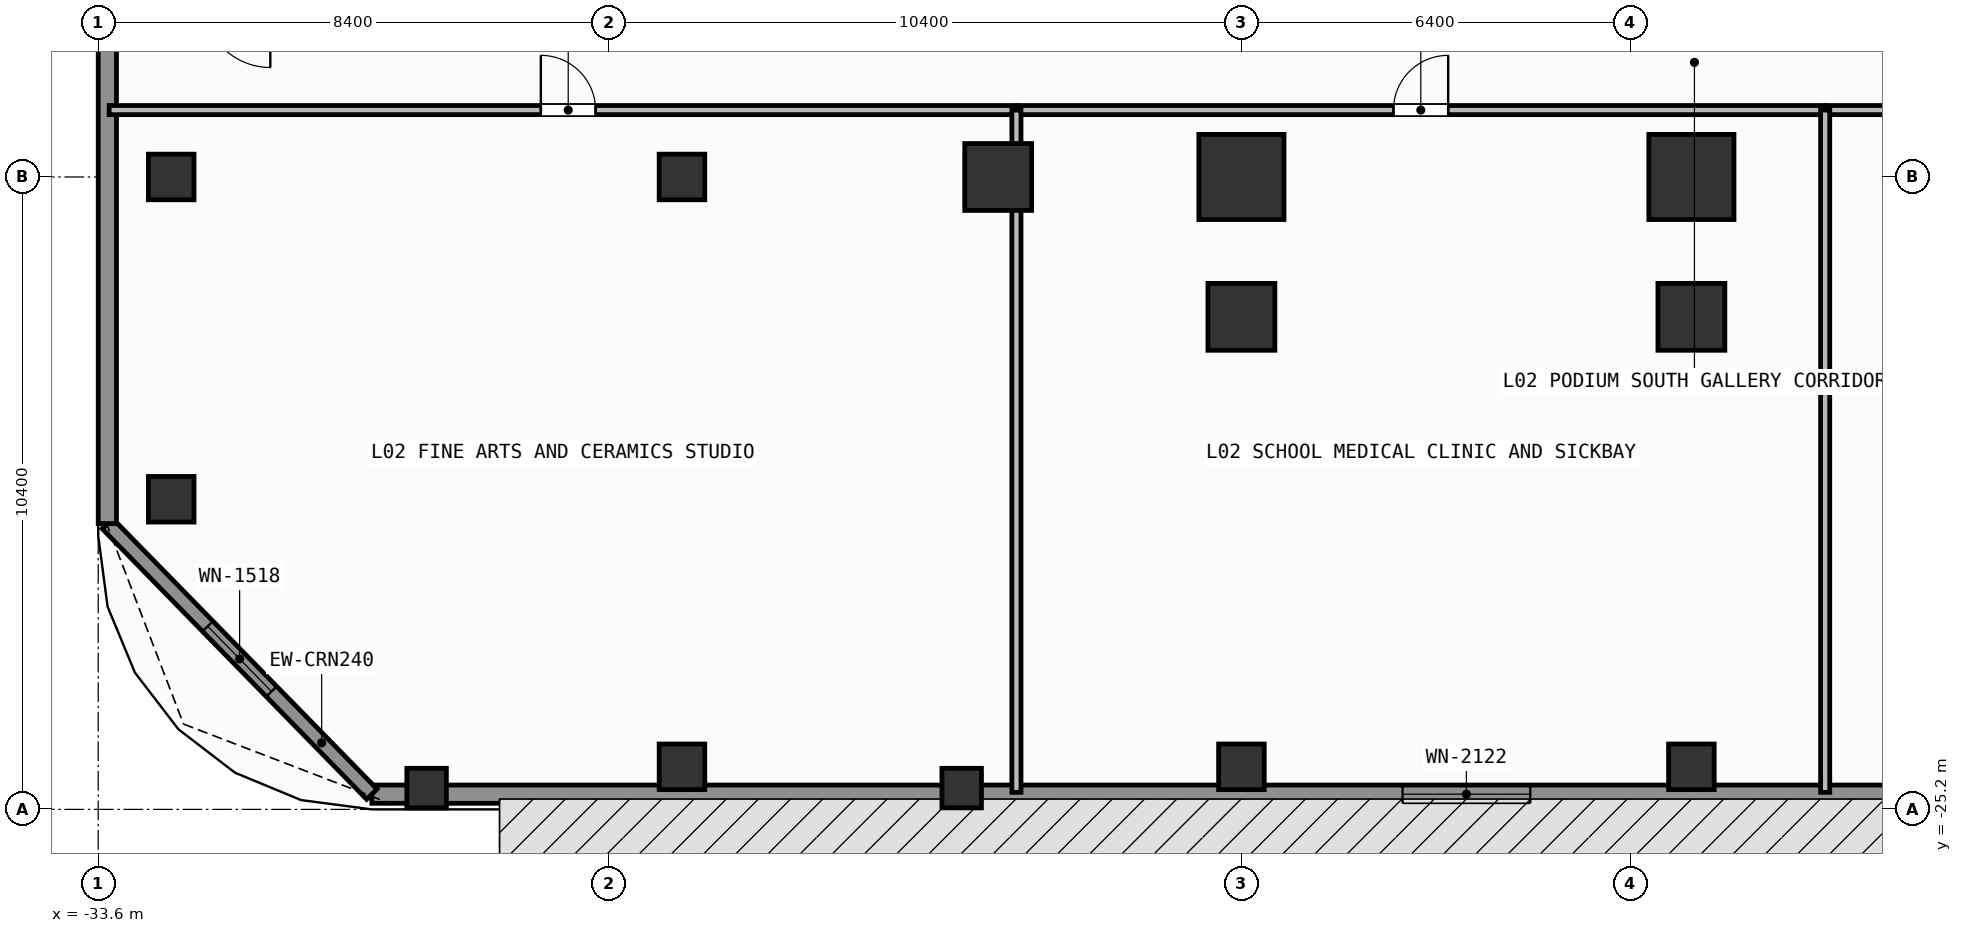
"""IFC4 building model, lengths in metres.
Left out: names, types, materials, properties, quantities, classifications, styles, units other than length and angle.
Written with IfcOpenShell. Run it as: python <this file> out.ifc"""

import sys

from ifc_helpers import new_model, si_unit, direction, frame, frame_2d, origin, origin_2d, place, context, subcontext, project, spatial, rectangle, extrude, element, fill, save


model = new_model("IFC4")
c1 = context("Model", 3, precision=1e-05, world=origin(), true_north=direction((0.0, 1.0)))
c2 = subcontext(c1, "Body", "Model", "MODEL_VIEW")
j1 = project(units=[si_unit("LENGTHUNIT", "METRE"), si_unit("PLANEANGLEUNIT", "RADIAN")], contexts=[c1])
p1 = place(None, origin())
s1 = spatial("IfcSite", under=j1, at=p1, CompositionType="ELEMENT")
p2 = place(p1, origin())
s2 = spatial("IfcBuilding", under=s1, at=p2, CompositionType="ELEMENT")
p3 = place(p2, frame((0.0, 0.0, 4.8)))
s3 = spatial("IfcBuildingStorey", under=s2, at=p3, CompositionType="ELEMENT", Elevation=4.8)
for number, where, z_axis, x_axis in (
    (1, (-14.8, -14.8, 0.0), (0.0, 0.0, 1.0), (1.0, 0.0, 0.0)),
    (2, (-7.4, -14.8, 0.0), (0.0, 0.0, 1.0), (1.0, 0.0, 0.0)),
):
    element("IfcColumn", number, at=place(p3, frame(where, z_axis=z_axis, x_axis=x_axis)), inside=s3, PredefinedType="COLUMN", context=c2, shape_type="SweptSolid", body=[
        extrude(rectangle(XDim=1.4, YDim=1.4, at=origin_2d()), origin(), (0.0, 0.0, 1.0), 4.2),
    ])
for number, where, z_axis, x_axis in (
    (3, (-18.8, -14.8, 0.0), (0.0, 0.0, 1.0), (1.0, 0.0, 0.0)),
    (4, (-14.8, -17.1, 0.0), (0.0, 0.0, 1.0), (1.0, 0.0, 0.0)),
    (5, (-7.4, -17.1, 0.0), (0.0, 0.0, 1.0), (1.0, 0.0, 0.0)),
):
    element("IfcColumn", number, at=place(p3, frame(where, z_axis=z_axis, x_axis=x_axis)), inside=s3, PredefinedType="COLUMN", context=c2, shape_type="SweptSolid", body=[
        extrude(rectangle(XDim=1.1, YDim=1.1, at=origin_2d()), origin(), (0.0, 0.0, 1.0), 4.2),
    ])
for number, where, z_axis, x_axis in (
    (6, (-32.4, -14.8, 0.0), (0.0, 0.0, 1.0), (1.0, 0.0, 0.0)),
    (7, (-24.0, -24.5, 0.0), (0.0, 0.0, 1.0), (1.0, 0.0, 0.0)),
    (8, (-24.0, -14.8, 0.0), (0.0, 0.0, 1.0), (1.0, 0.0, 0.0)),
    (9, (-14.8, -24.5, 0.0), (0.0, 0.0, 1.0), (1.0, 0.0, 0.0)),
    (10, (-7.4, -24.5, 0.0), (0.0, 0.0, 1.0), (1.0, 0.0, 0.0)),
    (11, (-32.4, -20.1, 0.0), (0.0, 0.0, 1.0), (1.0, 0.0, 0.0)),
):
    element("IfcColumn", number, at=place(p3, frame(where, z_axis=z_axis, x_axis=x_axis)), inside=s3, PredefinedType="COLUMN", context=c2, shape_type="SweptSolid", body=[
        extrude(rectangle(XDim=0.75, YDim=0.75, at=origin_2d()), origin(), (0.0, 0.0, 1.0), 4.2),
    ])
for number, where, z_axis, x_axis in (
    (12, (-28.2, -24.85, 0.0), (0.0, 0.0, 1.0), (1.0, 0.0, 0.0)),
    (13, (-19.4, -24.85, 0.0), (0.0, 0.0, 1.0), (1.0, 0.0, 0.0)),
):
    element("IfcColumn", number, at=place(p3, frame(where, z_axis=z_axis, x_axis=x_axis)), inside=s3, PredefinedType="PILASTER", context=c2, shape_type="SweptSolid", body=[
        extrude(rectangle(XDim=0.65, YDim=0.65, at=origin_2d()), origin(), (0.0, 0.0, 1.0), 4.2),
    ])
p4 = place(p3, frame((29.1, -24.95, 0.0), z_axis=(0.0, 0.0, 1.0), x_axis=(-1.0, 0.0, 0.0)))
e14 = element("IfcWall", 14, at=p4, inside=s3, PredefinedType="SOLIDWALL", context=c2, shape_type="SweptSolid", body=[
    extrude(rectangle(XDim=58.2, YDim=0.3, at=frame_2d((29.1, 0.0))), origin(), (0.0, 0.0, 1.0), 3.96),
])
p5 = place(p4, frame((39.15, 0.0, 0.85)))
e15 = element("IfcOpeningElement", 15, at=p5, cuts=e14, PredefinedType="OPENING", context=c2, shape_type="SweptSolid", body=[
    extrude(rectangle(XDim=2.1, YDim=2.2, at=frame_2d((1.05, 1.1))), frame((0.0, 0.16, 0.0), z_axis=(0.0, -1.0, 0.0), x_axis=(1.0, 0.0, 0.0)), (0.0, 0.0, 1.0), 0.32),
])
p6 = place(p4, frame((30.875, 0.0, 0.85)))
e16 = element("IfcOpeningElement", 16, at=p6, cuts=e14, PredefinedType="OPENING", context=c2, shape_type="SweptSolid", body=[
    extrude(rectangle(XDim=2.1, YDim=2.2, at=frame_2d((1.05, 1.1))), frame((0.0, 0.16, 0.0), z_axis=(0.0, -1.0, 0.0), x_axis=(1.0, 0.0, 0.0)), (0.0, 0.0, 1.0), 0.32),
])
p7 = place(p4, frame((24.35, 0.0, 0.85)))
e17 = element("IfcOpeningElement", 17, at=p7, cuts=e14, PredefinedType="OPENING", context=c2, shape_type="SweptSolid", body=[
    extrude(rectangle(XDim=2.1, YDim=2.2, at=frame_2d((1.05, 1.1))), frame((0.0, 0.16, 0.0), z_axis=(0.0, -1.0, 0.0), x_axis=(1.0, 0.0, 0.0)), (0.0, 0.0, 1.0), 0.32),
])
p8 = place(p4, frame((18.325, 0.0, 0.85)))
e18 = element("IfcOpeningElement", 18, at=p8, cuts=e14, PredefinedType="OPENING", context=c2, shape_type="SweptSolid", body=[
    extrude(rectangle(XDim=2.1, YDim=2.2, at=frame_2d((1.05, 1.1))), frame((0.0, 0.16, 0.0), z_axis=(0.0, -1.0, 0.0), x_axis=(1.0, 0.0, 0.0)), (0.0, 0.0, 1.0), 0.32),
])
p9 = place(p4, frame((6.483, 0.0, 0.85)))
e19 = element("IfcOpeningElement", 19, at=p9, cuts=e14, PredefinedType="OPENING", context=c2, shape_type="SweptSolid", body=[
    extrude(rectangle(XDim=2.1, YDim=2.2, at=frame_2d((1.05, 1.1))), frame((0.0, 0.16, 0.0), z_axis=(0.0, -1.0, 0.0), x_axis=(1.0, 0.0, 0.0)), (0.0, 0.0, 1.0), 0.32),
])
p10 = place(p3, frame((-29.1, -24.95, 0.0), z_axis=(0.0, 0.0, 1.0), x_axis=(-0.69901822973, 0.715103848756, 0.0)))
e20 = element("IfcWall", 20, at=p10, inside=s3, PredefinedType="SOLIDWALL", context=c2, shape_type="SweptSolid", body=[
    extrude(rectangle(XDim=6.223, YDim=0.24, at=frame_2d((3.111, 0.0))), origin(), (0.0, 0.0, 1.0), 3.96),
])
p11 = place(p10, frame((2.362, 0.0, 0.85)))
e21 = element("IfcOpeningElement", 21, at=p11, cuts=e20, PredefinedType="OPENING", context=c2, shape_type="SweptSolid", body=[
    extrude(rectangle(XDim=1.5, YDim=1.85, at=frame_2d((0.75, 0.925))), frame((0.0, 0.13, 0.0), z_axis=(0.0, -1.0, 0.0), x_axis=(1.0, 0.0, 0.0)), (0.0, 0.0, 1.0), 0.26),
])
p12 = place(p3, frame((-33.45, -20.5, 0.0), z_axis=(0.0, 0.0, 1.0), x_axis=(0.0, 1.0, 0.0)))
e22 = element("IfcWall", 22, at=p12, inside=s3, PredefinedType="SOLIDWALL", context=c2, shape_type="SweptSolid", body=[
    extrude(rectangle(XDim=14.09, YDim=0.3, at=frame_2d((7.045, 0.0))), origin(), (0.0, 0.0, 1.0), 3.96),
])
p13 = place(p3, frame((-33.42, -13.7, 0.0), z_axis=(0.0, 0.0, 1.0), x_axis=(1.0, 0.0, 0.0)))
e23 = element("IfcWall", 23, at=p13, inside=s3, PredefinedType="PARTITIONING", context=c2, shape_type="SweptSolid", body=[
    extrude(rectangle(XDim=14.92, YDim=0.15, at=frame_2d((7.46, 0.0))), origin(), (0.0, 0.0, 1.0), 3.96),
])
p14 = place(p13, frame((7.099, 0.0, 0.0)))
e24 = element("IfcOpeningElement", 24, at=p14, cuts=e23, PredefinedType="OPENING", context=c2, shape_type="SweptSolid", body=[
    extrude(rectangle(XDim=0.9, YDim=2.1, at=frame_2d((0.45, 1.05))), frame((0.0, 0.085, 0.0), z_axis=(0.0, -1.0, 0.0), x_axis=(1.0, 0.0, 0.0)), (0.0, 0.0, 1.0), 0.17),
])
p15 = place(p3, frame((-18.5, -13.7, 0.0), z_axis=(0.0, 0.0, 1.0), x_axis=(1.0, 0.0, 0.0)))
e25 = element("IfcWall", 25, at=p15, inside=s3, PredefinedType="PARTITIONING", context=c2, shape_type="SweptSolid", body=[
    extrude(rectangle(XDim=13.3, YDim=0.15, at=frame_2d((6.65, 0.0))), origin(), (0.0, 0.0, 1.0), 3.96),
])
p16 = place(p15, frame((6.2, 0.0, 0.0)))
e26 = element("IfcOpeningElement", 26, at=p16, cuts=e25, PredefinedType="OPENING", context=c2, shape_type="SweptSolid", body=[
    extrude(rectangle(XDim=0.9, YDim=2.1, at=frame_2d((0.45, 1.05))), frame((0.0, 0.085, 0.0), z_axis=(0.0, -1.0, 0.0), x_axis=(1.0, 0.0, 0.0)), (0.0, 0.0, 1.0), 0.17),
])
p17 = place(p3, frame((-5.2, -13.7, 0.0), z_axis=(0.0, 0.0, 1.0), x_axis=(1.0, 0.0, 0.0)))
e27 = element("IfcWall", 27, at=p17, inside=s3, PredefinedType="PARTITIONING", context=c2, shape_type="SweptSolid", body=[
    extrude(rectangle(XDim=16.8, YDim=0.15, at=frame_2d((8.4, 0.0))), origin(), (0.0, 0.0, 1.0), 3.96),
])
p18 = place(p17, frame((7.861, 0.0, 0.0)))
e28 = element("IfcOpeningElement", 28, at=p18, cuts=e27, PredefinedType="OPENING", context=c2, shape_type="SweptSolid", body=[
    extrude(rectangle(XDim=0.9, YDim=2.1, at=frame_2d((0.45, 1.05))), frame((0.0, 0.085, 0.0), z_axis=(0.0, -1.0, 0.0), x_axis=(1.0, 0.0, 0.0)), (0.0, 0.0, 1.0), 0.17),
])
p19 = place(p3, frame((-18.5, -24.92, 0.0), z_axis=(0.0, 0.0, 1.0), x_axis=(0.0, 1.0, 0.0)))
e29 = element("IfcWall", 29, at=p19, inside=s3, PredefinedType="PARTITIONING", context=c2, shape_type="SweptSolid", body=[
    extrude(rectangle(XDim=11.22, YDim=0.15, at=frame_2d((5.61, 0.0))), origin(), (0.0, 0.0, 1.0), 3.25),
])
p20 = place(p3, frame((-5.2, -24.92, 0.0), z_axis=(0.0, 0.0, 1.0), x_axis=(0.0, 1.0, 0.0)))
e30 = element("IfcWall", 30, at=p20, inside=s3, PredefinedType="PARTITIONING", context=c2, shape_type="SweptSolid", body=[
    extrude(rectangle(XDim=11.22, YDim=0.15, at=frame_2d((5.61, 0.0))), origin(), (0.0, 0.0, 1.0), 3.96),
])
p21 = place(p11, origin())
e31 = element("IfcWindow", 31, at=p21, inside=s3, PartitioningType="SINGLE_PANEL", PredefinedType="WINDOW", context=c2, shape_type="SweptSolid", body=[
    extrude(rectangle(XDim=1.5, YDim=1.85, at=frame_2d((0.75, 0.925))), frame((0.0, 0.03, 0.0), z_axis=(0.0, -1.0, 0.0), x_axis=(1.0, 0.0, 0.0)), (0.0, 0.0, 1.0), 0.06),
])
fill(e21, e31)
p22 = place(p5, origin())
e32 = element("IfcWindow", 32, at=p22, inside=s3, PartitioningType="SINGLE_PANEL", PredefinedType="WINDOW", context=c2, shape_type="SweptSolid", body=[
    extrude(rectangle(XDim=2.1, YDim=2.2, at=frame_2d((1.05, 1.1))), frame((0.0, 0.03, 0.0), z_axis=(0.0, -1.0, 0.0), x_axis=(1.0, 0.0, 0.0)), (0.0, 0.0, 1.0), 0.06),
])
fill(e15, e32)
p23 = place(p14, origin())
e33 = element("IfcDoor", 33, at=p23, inside=s3, OperationType="SINGLE_SWING_LEFT", PredefinedType="DOOR", context=c2, shape_type="SweptSolid", body=[
    extrude(rectangle(XDim=0.9, YDim=2.1, at=frame_2d((0.45, 1.05))), frame((0.0, 0.025, 0.0), z_axis=(0.0, -1.0, 0.0), x_axis=(1.0, 0.0, 0.0)), (0.0, 0.0, 1.0), 0.05),
])
fill(e24, e33)
p24 = place(p16, origin())
e34 = element("IfcDoor", 34, at=p24, inside=s3, OperationType="SINGLE_SWING_RIGHT", PredefinedType="DOOR", context=c2, shape_type="SweptSolid", body=[
    extrude(rectangle(XDim=0.9, YDim=2.1, at=frame_2d((0.45, 1.05))), frame((0.0, 0.025, 0.0), z_axis=(0.0, -1.0, 0.0), x_axis=(1.0, 0.0, 0.0)), (0.0, 0.0, 1.0), 0.05),
])
fill(e26, e34)
save(model, sys.argv[1])
